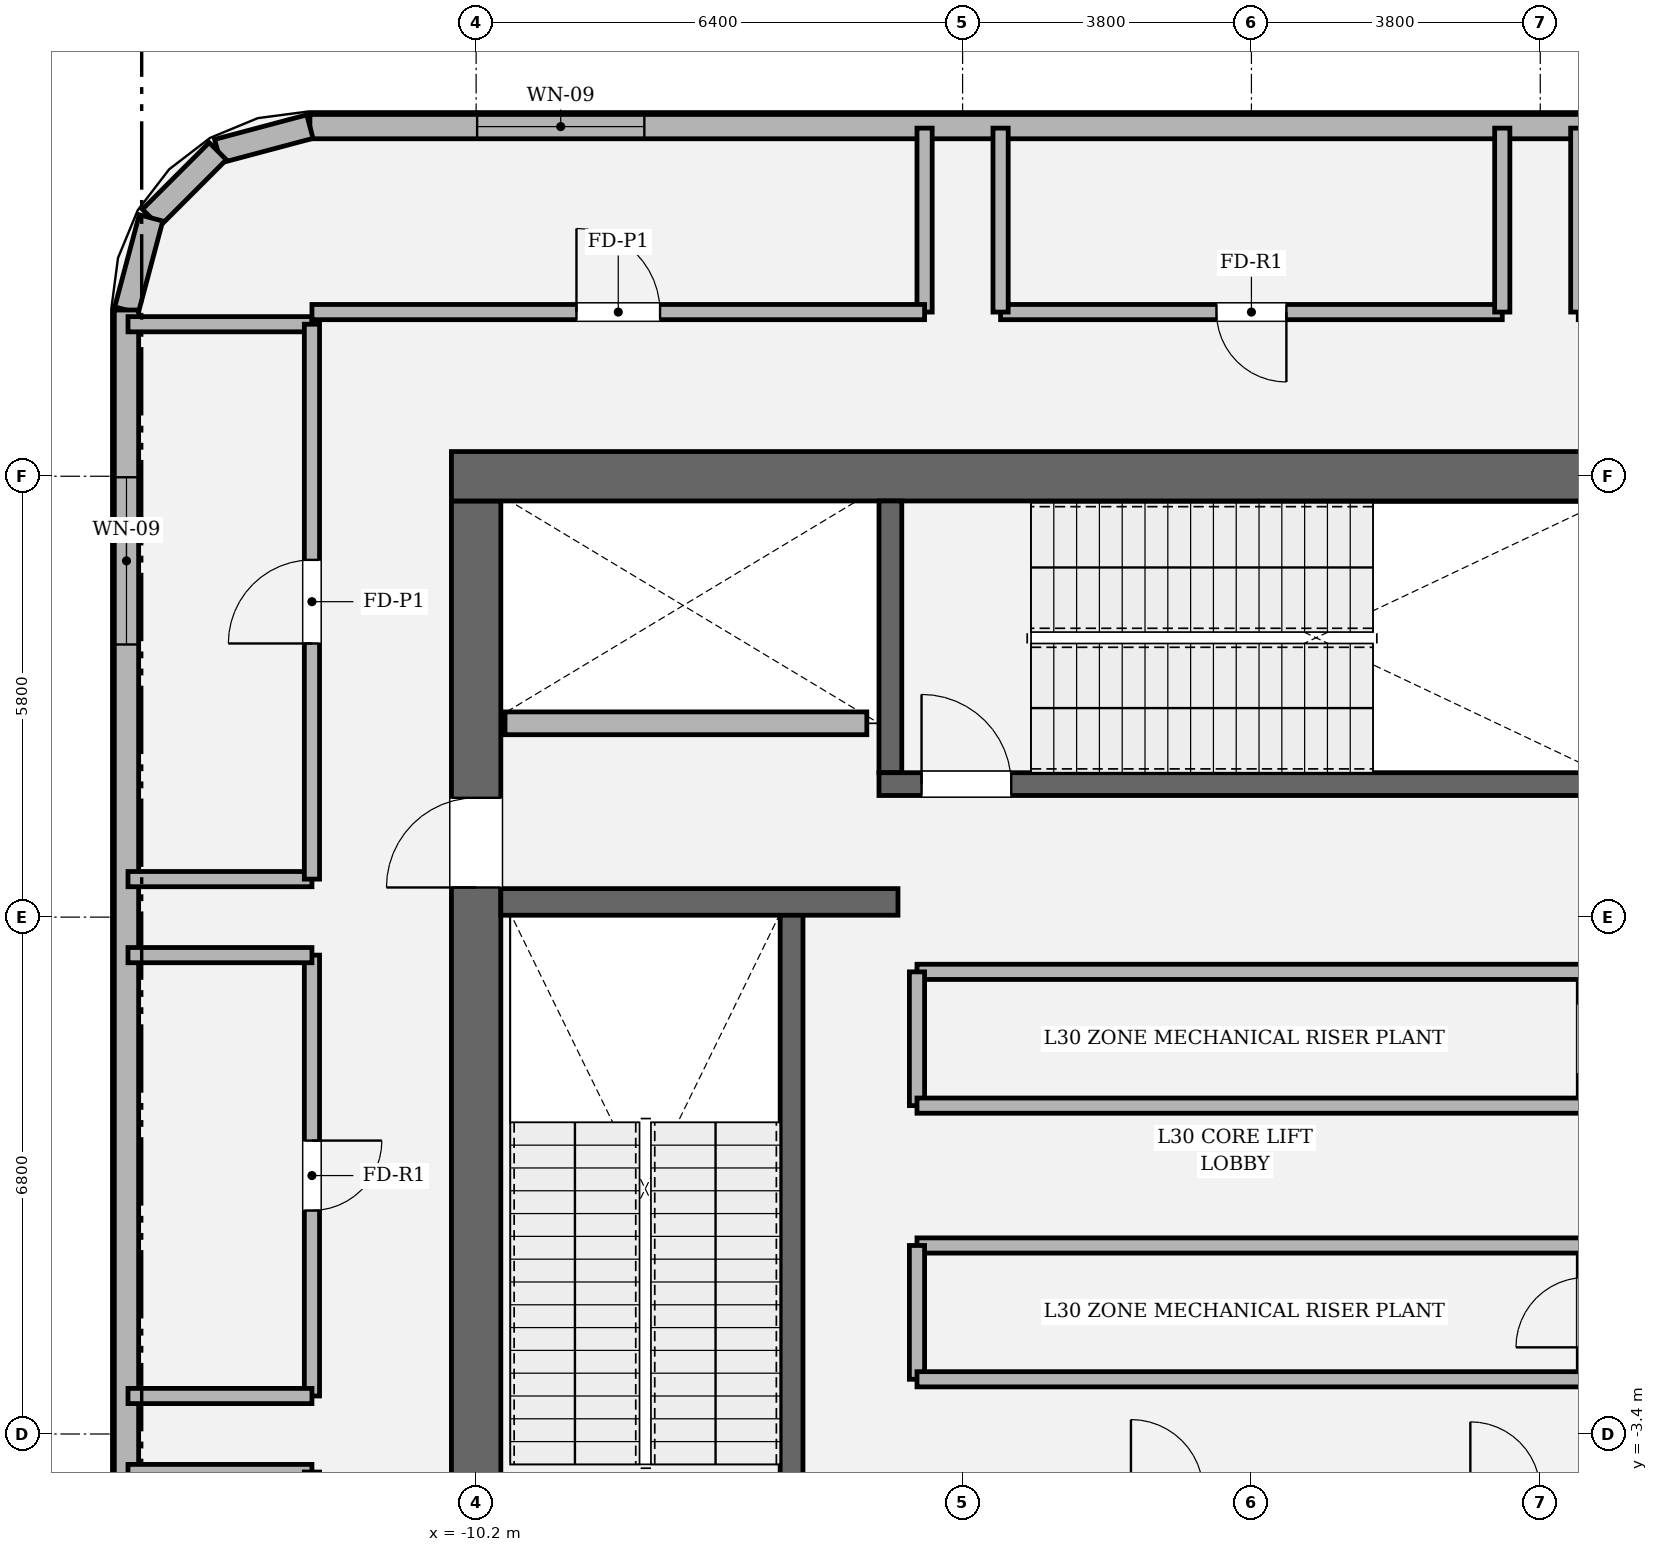
"""IFC4 building model, lengths in metres.
Left out: names, types, materials, properties, quantities, classifications, styles, units other than length and angle.
Written with IfcOpenShell. Run it as: python <this file> out.ifc"""

import sys

from ifc_helpers import new_model, si_unit, direction, frame, frame_2d, origin, place, context, subcontext, project, spatial, rectangle, extrude, element, fill, save


model = new_model("IFC4")
c1 = context("Model", 3, precision=1e-05, world=origin(), true_north=direction((0.0, 1.0)))
c2 = subcontext(c1, "Body", "Model", "MODEL_VIEW")
j1 = project(units=[si_unit("LENGTHUNIT", "METRE"), si_unit("PLANEANGLEUNIT", "RADIAN")], contexts=[c1])
p1 = place(None, origin())
s1 = spatial("IfcSite", under=j1, at=p1, CompositionType="ELEMENT")
p2 = place(p1, origin())
s2 = spatial("IfcBuilding", under=s1, at=p2, CompositionType="ELEMENT")
p3 = place(p2, frame((0.0, 0.0, 130.2)))
s3 = spatial("IfcBuildingStorey", under=s2, at=p3, CompositionType="ELEMENT", Elevation=130.2)
p4 = place(p3, frame((-10.2, -8.875, 0.0), z_axis=(0.0, 0.0, 1.0), x_axis=(0.0, 1.0, 0.0)))
e1 = element("IfcWall", 1, at=p4, inside=s3, PredefinedType="SHEAR", context=c2, shape_type="SweptSolid", body=[
    extrude(rectangle(XDim=17.75, YDim=0.65, at=frame_2d((8.875, 0.0))), origin(), (0.0, 0.0, 1.0), 4.8),
])
p5 = place(p4, frame((12.665, 0.0, 0.0)))
e2 = element("IfcOpeningElement", 2, at=p5, cuts=e1, PredefinedType="OPENING", context=c2, shape_type="SweptSolid", body=[
    extrude(rectangle(XDim=1.18, YDim=2.2, at=frame_2d((0.59, 1.1))), frame((0.0, 0.335, 0.0), z_axis=(0.0, -1.0, 0.0), x_axis=(1.0, 0.0, 0.0)), (0.0, 0.0, 1.0), 0.67),
])
p6 = place(p3, frame((-10.525, 9.2, 0.0), z_axis=(0.0, 0.0, 1.0), x_axis=(1.0, 0.0, 0.0)))
e3 = element("IfcWall", 3, at=p6, inside=s3, PredefinedType="SHEAR", context=c2, shape_type="SweptSolid", body=[
    extrude(rectangle(XDim=21.05, YDim=0.65, at=frame_2d((10.525, 0.0))), origin(), (0.0, 0.0, 1.0), 4.8),
])
p7 = place(p3, frame((-6.05, -5.5, 0.0), z_axis=(0.0, 0.0, 1.0), x_axis=(0.0, 1.0, 0.0)))
e4 = element("IfcWall", 4, at=p7, inside=s3, PredefinedType="SOLIDWALL", context=c2, shape_type="SweptSolid", body=[
    extrude(rectangle(XDim=8.95, YDim=0.3, at=frame_2d((4.475, 0.0))), origin(), (0.0, 0.0, 1.0), 4.8),
])
p8 = place(p3, frame((-4.75, 5.3, 0.0), z_axis=(0.0, 0.0, 1.0), x_axis=(0.0, 1.0, 0.0)))
e5 = element("IfcWall", 5, at=p8, inside=s3, PredefinedType="SOLIDWALL", context=c2, shape_type="SweptSolid", body=[
    extrude(rectangle(XDim=3.575, YDim=0.3, at=frame_2d((1.788, 0.0))), origin(), (0.0, 0.0, 1.0), 4.8),
])
p9 = place(p3, frame((-4.9, 5.15, 0.0), z_axis=(0.0, 0.0, 1.0), x_axis=(1.0, 0.0, 0.0)))
e6 = element("IfcWall", 6, at=p9, inside=s3, PredefinedType="SOLIDWALL", context=c2, shape_type="SweptSolid", body=[
    extrude(rectangle(XDim=9.8, YDim=0.3, at=frame_2d((4.9, 0.0))), origin(), (0.0, 0.0, 1.0), 4.8),
])
p10 = place(p9, frame((0.56, 0.0, 0.0)))
e7 = element("IfcOpeningElement", 7, at=p10, cuts=e6, PredefinedType="OPENING", context=c2, shape_type="SweptSolid", body=[
    extrude(rectangle(XDim=1.18, YDim=2.2, at=frame_2d((0.59, 1.1))), frame((0.0, 0.16, 0.0), z_axis=(0.0, -1.0, 0.0), x_axis=(1.0, 0.0, 0.0)), (0.0, 0.0, 1.0), 0.32),
])
p11 = place(p3, frame((-9.875, 3.6, 0.0), z_axis=(0.0, 0.0, 1.0), x_axis=(1.0, 0.0, 0.0)))
e8 = element("IfcWall", 8, at=p11, inside=s3, PredefinedType="SOLIDWALL", context=c2, shape_type="SweptSolid", body=[
    extrude(rectangle(XDim=5.225, YDim=0.35, at=frame_2d((2.613, 0.0))), origin(), (0.0, 0.0, 1.0), 4.8),
])
p12 = place(p3, frame((12.387, 13.8, 0.0), z_axis=(0.0, 0.0, 1.0), x_axis=(-1.0, 0.0, 0.0)))
e9 = element("IfcWall", 9, at=p12, inside=s3, PredefinedType="SOLIDWALL", context=c2, shape_type="SweptSolid", body=[
    extrude(rectangle(XDim=24.774, YDim=0.32, at=frame_2d((12.387, 0.0))), origin(), (0.0, 0.0, 1.0), 3.834),
])
p13 = place(p12, frame((2.2, 0.0, 0.9)))
e10 = element("IfcOpeningElement", 10, at=p13, cuts=e9, PredefinedType="OPENING", context=c2, shape_type="SweptSolid", body=[
    extrude(rectangle(XDim=2.2, YDim=1.2, at=frame_2d((1.1, 0.6))), frame((0.0, 0.17, 0.0), z_axis=(0.0, -1.0, 0.0), x_axis=(1.0, 0.0, 0.0)), (0.0, 0.0, 1.0), 0.34),
])
p14 = place(p12, frame((20.374, 0.0, 0.9)))
e11 = element("IfcOpeningElement", 11, at=p14, cuts=e9, PredefinedType="OPENING", context=c2, shape_type="SweptSolid", body=[
    extrude(rectangle(XDim=2.2, YDim=1.2, at=frame_2d((1.1, 0.6))), frame((0.0, 0.17, 0.0), z_axis=(0.0, -1.0, 0.0), x_axis=(1.0, 0.0, 0.0)), (0.0, 0.0, 1.0), 0.34),
])
p15 = place(p3, frame((-12.387, 13.8, 0.0), z_axis=(0.0, 0.0, 1.0), x_axis=(-0.966283375382, -0.25748094776, 0.0)))
e12 = element("IfcWall", 12, at=p15, inside=s3, PredefinedType="SOLIDWALL", context=c2, shape_type="SweptSolid", body=[
    extrude(rectangle(XDim=1.254, YDim=0.32, at=frame_2d((0.627, 0.0))), origin(), (0.0, 0.0, 1.0), 3.984),
])
p16 = place(p3, frame((-13.599, 13.477, 0.0), z_axis=(0.0, 0.0, 1.0), x_axis=(-0.707106781187, -0.707106781187, 0.0)))
e13 = element("IfcWall", 13, at=p16, inside=s3, PredefinedType="SOLIDWALL", context=c2, shape_type="SweptSolid", body=[
    extrude(rectangle(XDim=1.242, YDim=0.32, at=frame_2d((0.621, 0.0))), origin(), (0.0, 0.0, 1.0), 3.984),
])
p17 = place(p3, frame((-14.477, 12.599, 0.0), z_axis=(0.0, 0.0, 1.0), x_axis=(-0.25748094776, -0.966283375382, 0.0)))
e14 = element("IfcWall", 14, at=p17, inside=s3, PredefinedType="SOLIDWALL", context=c2, shape_type="SweptSolid", body=[
    extrude(rectangle(XDim=1.254, YDim=0.32, at=frame_2d((0.627, 0.0))), origin(), (0.0, 0.0, 1.0), 3.984),
])
p18 = place(p3, frame((-14.8, 11.387, 0.0), z_axis=(0.0, 0.0, 1.0), x_axis=(0.0, -1.0, 0.0)))
e15 = element("IfcWall", 15, at=p18, inside=s3, PredefinedType="SOLIDWALL", context=c2, shape_type="SweptSolid", body=[
    extrude(rectangle(XDim=22.774, YDim=0.32, at=frame_2d((11.387, 0.0))), origin(), (0.0, 0.0, 1.0), 3.834),
])
p19 = place(p18, frame((2.2, 0.0, 0.9)))
e16 = element("IfcOpeningElement", 16, at=p19, cuts=e15, PredefinedType="OPENING", context=c2, shape_type="SweptSolid", body=[
    extrude(rectangle(XDim=2.2, YDim=1.2, at=frame_2d((1.1, 0.6))), frame((0.0, 0.17, 0.0), z_axis=(0.0, -1.0, 0.0), x_axis=(1.0, 0.0, 0.0)), (0.0, 0.0, 1.0), 0.34),
])
p20 = place(p18, frame((18.374, 0.0, 0.9)))
e17 = element("IfcOpeningElement", 17, at=p20, cuts=e15, PredefinedType="OPENING", context=c2, shape_type="SweptSolid", body=[
    extrude(rectangle(XDim=2.2, YDim=1.2, at=frame_2d((1.1, 0.6))), frame((0.0, 0.17, 0.0), z_axis=(0.0, -1.0, 0.0), x_axis=(1.0, 0.0, 0.0)), (0.0, 0.0, 1.0), 0.34),
])
p21 = place(p3, frame((-9.82, 5.95, 0.0), z_axis=(0.0, 0.0, 1.0), x_axis=(1.0, 0.0, 0.0)))
e18 = element("IfcWall", 18, at=p21, inside=s3, PredefinedType="SOLIDWALL", context=c2, shape_type="SweptSolid", body=[
    extrude(rectangle(XDim=4.76, YDim=0.3, at=frame_2d((2.38, 0.0))), origin(), (0.0, 0.0, 1.0), 4.54),
])
p22 = place(p3, frame((4.4, -2.68, 0.0), z_axis=(0.0, 0.0, 1.0), x_axis=(0.0, 1.0, 0.0)))
e19 = element("IfcWall", 19, at=p22, inside=s3, PredefinedType="SOLIDWALL", context=c2, shape_type="SweptSolid", body=[
    extrude(rectangle(XDim=1.76, YDim=0.2, at=frame_2d((0.88, 0.0))), origin(), (0.0, 0.0, 1.0), 4.54),
])
p23 = place(p22, frame((0.42, 0.0, 0.0)))
e20 = element("IfcOpeningElement", 20, at=p23, cuts=e19, PredefinedType="OPENING", context=c2, shape_type="SweptSolid", body=[
    extrude(rectangle(XDim=0.92, YDim=2.1, at=frame_2d((0.46, 1.05))), frame((0.0, 0.11, 0.0), z_axis=(0.0, -1.0, 0.0), x_axis=(1.0, 0.0, 0.0)), (0.0, 0.0, 1.0), 0.22),
])
p24 = place(p3, frame((4.4, -0.92, 0.0), z_axis=(0.0, 0.0, 1.0), x_axis=(-1.0, 0.0, 0.0)))
e21 = element("IfcWall", 21, at=p24, inside=s3, PredefinedType="SOLIDWALL", context=c2, shape_type="SweptSolid", body=[
    extrude(rectangle(XDim=8.8, YDim=0.2, at=frame_2d((4.4, 0.0))), origin(), (0.0, 0.0, 1.0), 4.54),
])
p25 = place(p3, frame((-4.4, -0.92, 0.0), z_axis=(0.0, 0.0, 1.0), x_axis=(0.0, -1.0, 0.0)))
e22 = element("IfcWall", 22, at=p25, inside=s3, PredefinedType="SOLIDWALL", context=c2, shape_type="SweptSolid", body=[
    extrude(rectangle(XDim=1.76, YDim=0.2, at=frame_2d((0.88, 0.0))), origin(), (0.0, 0.0, 1.0), 4.54),
])
p26 = place(p3, frame((-4.4, -2.68, 0.0), z_axis=(0.0, 0.0, 1.0), x_axis=(1.0, 0.0, 0.0)))
e23 = element("IfcWall", 23, at=p26, inside=s3, PredefinedType="SOLIDWALL", context=c2, shape_type="SweptSolid", body=[
    extrude(rectangle(XDim=8.8, YDim=0.2, at=frame_2d((4.4, 0.0))), origin(), (0.0, 0.0, 1.0), 4.54),
])
p27 = place(p3, frame((4.4, 0.92, 0.0), z_axis=(0.0, 0.0, 1.0), x_axis=(0.0, 1.0, 0.0)))
e24 = element("IfcWall", 24, at=p27, inside=s3, PredefinedType="SOLIDWALL", context=c2, shape_type="SweptSolid", body=[
    extrude(rectangle(XDim=1.76, YDim=0.2, at=frame_2d((0.88, 0.0))), origin(), (0.0, 0.0, 1.0), 4.54),
])
p28 = place(p27, frame((0.42, 0.0, 0.0)))
e25 = element("IfcOpeningElement", 25, at=p28, cuts=e24, PredefinedType="OPENING", context=c2, shape_type="SweptSolid", body=[
    extrude(rectangle(XDim=0.92, YDim=2.1, at=frame_2d((0.46, 1.05))), frame((0.0, 0.11, 0.0), z_axis=(0.0, -1.0, 0.0), x_axis=(1.0, 0.0, 0.0)), (0.0, 0.0, 1.0), 0.22),
])
p29 = place(p3, frame((4.4, 2.68, 0.0), z_axis=(0.0, 0.0, 1.0), x_axis=(-1.0, 0.0, 0.0)))
e26 = element("IfcWall", 26, at=p29, inside=s3, PredefinedType="SOLIDWALL", context=c2, shape_type="SweptSolid", body=[
    extrude(rectangle(XDim=8.8, YDim=0.2, at=frame_2d((4.4, 0.0))), origin(), (0.0, 0.0, 1.0), 4.54),
])
p30 = place(p3, frame((-4.4, 2.68, 0.0), z_axis=(0.0, 0.0, 1.0), x_axis=(0.0, -1.0, 0.0)))
e27 = element("IfcWall", 27, at=p30, inside=s3, PredefinedType="SOLIDWALL", context=c2, shape_type="SweptSolid", body=[
    extrude(rectangle(XDim=1.76, YDim=0.2, at=frame_2d((0.88, 0.0))), origin(), (0.0, 0.0, 1.0), 4.54),
])
p31 = place(p3, frame((-4.4, 0.92, 0.0), z_axis=(0.0, 0.0, 1.0), x_axis=(1.0, 0.0, 0.0)))
e28 = element("IfcWall", 28, at=p31, inside=s3, PredefinedType="SOLIDWALL", context=c2, shape_type="SweptSolid", body=[
    extrude(rectangle(XDim=8.8, YDim=0.2, at=frame_2d((4.4, 0.0))), origin(), (0.0, 0.0, 1.0), 4.54),
])
p32 = place(p3, frame((-14.78, -3.9, 0.0), z_axis=(0.0, 0.0, 1.0), x_axis=(1.0, 0.0, 0.0)))
e29 = element("IfcWall", 29, at=p32, inside=s3, PredefinedType="SOLIDWALL", context=c2, shape_type="SweptSolid", body=[
    extrude(rectangle(XDim=2.42, YDim=0.2, at=frame_2d((1.21, 0.0))), origin(), (0.0, 0.0, 1.0), 3.984),
])
p33 = place(p3, frame((-12.36, -3.9, 0.0), z_axis=(0.0, 0.0, 1.0), x_axis=(0.0, -1.0, 0.0)))
e30 = element("IfcWall", 30, at=p33, inside=s3, PredefinedType="SOLIDWALL", context=c2, shape_type="SweptSolid", body=[
    extrude(rectangle(XDim=7.3, YDim=0.2, at=frame_2d((3.65, 0.0))), origin(), (0.0, 0.0, 1.0), 4.54),
])
p34 = place(p33, frame((3.1, 0.0, 0.0)))
e31 = element("IfcOpeningElement", 31, at=p34, cuts=e30, PredefinedType="OPENING", context=c2, shape_type="SweptSolid", body=[
    extrude(rectangle(XDim=1.1, YDim=2.2, at=frame_2d((0.55, 1.1))), frame((0.0, 0.11, 0.0), z_axis=(0.0, -1.0, 0.0), x_axis=(1.0, 0.0, 0.0)), (0.0, 0.0, 1.0), 0.22),
])
p35 = place(p3, frame((-12.36, 2.9, 0.0), z_axis=(0.0, 0.0, 1.0), x_axis=(0.0, -1.0, 0.0)))
e32 = element("IfcWall", 32, at=p35, inside=s3, PredefinedType="SOLIDWALL", context=c2, shape_type="SweptSolid", body=[
    extrude(rectangle(XDim=5.8, YDim=0.2, at=frame_2d((2.9, 0.0))), origin(), (0.0, 0.0, 1.0), 4.54),
])
p36 = place(p35, frame((2.44, 0.0, 0.0)))
e33 = element("IfcOpeningElement", 33, at=p36, cuts=e32, PredefinedType="OPENING", context=c2, shape_type="SweptSolid", body=[
    extrude(rectangle(XDim=0.92, YDim=2.1, at=frame_2d((0.46, 1.05))), frame((0.0, 0.11, 0.0), z_axis=(0.0, -1.0, 0.0), x_axis=(1.0, 0.0, 0.0)), (0.0, 0.0, 1.0), 0.22),
])
for number, where, z_axis, x_axis in (
    (34, (-12.36, -2.9, 0.0), (0.0, 0.0, 1.0), (-1.0, 0.0, 0.0)),
    (35, (-14.78, 2.9, 0.0), (0.0, 0.0, 1.0), (1.0, 0.0, 0.0)),
    (36, (-12.36, 3.9, 0.0), (0.0, 0.0, 1.0), (-1.0, 0.0, 0.0)),
    (37, (-14.78, 11.2, 0.0), (0.0, 0.0, 1.0), (1.0, 0.0, 0.0)),
):
    element("IfcWall", number, at=place(p3, frame(where, z_axis=z_axis, x_axis=x_axis)), inside=s3, PredefinedType="SOLIDWALL", context=c2, shape_type="SweptSolid", body=[
        extrude(rectangle(XDim=2.42, YDim=0.2, at=frame_2d((1.21, 0.0))), origin(), (0.0, 0.0, 1.0), 3.984),
    ])
p37 = place(p3, frame((-12.36, 11.2, 0.0), z_axis=(0.0, 0.0, 1.0), x_axis=(0.0, -1.0, 0.0)))
e38 = element("IfcWall", 38, at=p37, inside=s3, PredefinedType="SOLIDWALL", context=c2, shape_type="SweptSolid", body=[
    extrude(rectangle(XDim=7.3, YDim=0.2, at=frame_2d((3.65, 0.0))), origin(), (0.0, 0.0, 1.0), 4.54),
])
p38 = place(p37, frame((3.1, 0.0, 0.0)))
e39 = element("IfcOpeningElement", 39, at=p38, cuts=e38, PredefinedType="OPENING", context=c2, shape_type="SweptSolid", body=[
    extrude(rectangle(XDim=1.1, YDim=2.2, at=frame_2d((0.55, 1.1))), frame((0.0, 0.11, 0.0), z_axis=(0.0, -1.0, 0.0), x_axis=(1.0, 0.0, 0.0)), (0.0, 0.0, 1.0), 0.22),
])
p39 = place(p3, frame((-4.3, 13.78, 0.0), z_axis=(0.0, 0.0, 1.0), x_axis=(0.0, -1.0, 0.0)))
e40 = element("IfcWall", 40, at=p39, inside=s3, PredefinedType="SOLIDWALL", context=c2, shape_type="SweptSolid", body=[
    extrude(rectangle(XDim=2.42, YDim=0.2, at=frame_2d((1.21, 0.0))), origin(), (0.0, 0.0, 1.0), 3.984),
])
p40 = place(p3, frame((-4.3, 11.36, 0.0), z_axis=(0.0, 0.0, 1.0), x_axis=(-1.0, 0.0, 0.0)))
e41 = element("IfcWall", 41, at=p40, inside=s3, PredefinedType="SOLIDWALL", context=c2, shape_type="SweptSolid", body=[
    extrude(rectangle(XDim=8.06, YDim=0.2, at=frame_2d((4.03, 0.0))), origin(), (0.0, 0.0, 1.0), 4.54),
])
p41 = place(p40, frame((3.48, 0.0, 0.0)))
e42 = element("IfcOpeningElement", 42, at=p41, cuts=e41, PredefinedType="OPENING", context=c2, shape_type="SweptSolid", body=[
    extrude(rectangle(XDim=1.1, YDim=2.2, at=frame_2d((0.55, 1.1))), frame((0.0, 0.11, 0.0), z_axis=(0.0, -1.0, 0.0), x_axis=(1.0, 0.0, 0.0)), (0.0, 0.0, 1.0), 0.22),
])
p42 = place(p3, frame((3.3, 11.36, 0.0), z_axis=(0.0, 0.0, 1.0), x_axis=(-1.0, 0.0, 0.0)))
e43 = element("IfcWall", 43, at=p42, inside=s3, PredefinedType="SOLIDWALL", context=c2, shape_type="SweptSolid", body=[
    extrude(rectangle(XDim=6.6, YDim=0.2, at=frame_2d((3.3, 0.0))), origin(), (0.0, 0.0, 1.0), 4.54),
])
p43 = place(p42, frame((2.84, 0.0, 0.0)))
e44 = element("IfcOpeningElement", 44, at=p43, cuts=e43, PredefinedType="OPENING", context=c2, shape_type="SweptSolid", body=[
    extrude(rectangle(XDim=0.92, YDim=2.1, at=frame_2d((0.46, 1.05))), frame((0.0, 0.11, 0.0), z_axis=(0.0, -1.0, 0.0), x_axis=(1.0, 0.0, 0.0)), (0.0, 0.0, 1.0), 0.22),
])
for number, where, z_axis, x_axis in (
    (45, (-3.3, 11.36, 0.0), (0.0, 0.0, 1.0), (0.0, 1.0, 0.0)),
    (46, (3.3, 13.78, 0.0), (0.0, 0.0, 1.0), (0.0, -1.0, 0.0)),
    (47, (4.3, 11.36, 0.0), (0.0, 0.0, 1.0), (0.0, 1.0, 0.0)),
):
    element("IfcWall", number, at=place(p3, frame(where, z_axis=z_axis, x_axis=x_axis)), inside=s3, PredefinedType="SOLIDWALL", context=c2, shape_type="SweptSolid", body=[
        extrude(rectangle(XDim=2.42, YDim=0.2, at=frame_2d((1.21, 0.0))), origin(), (0.0, 0.0, 1.0), 3.984),
    ])
p44 = place(p14, origin())
e48 = element("IfcWindow", 48, at=p44, inside=s3, PartitioningType="SINGLE_PANEL", PredefinedType="WINDOW", context=c2, shape_type="SweptSolid", body=[
    extrude(rectangle(XDim=2.2, YDim=1.2, at=frame_2d((1.1, 0.6))), frame((0.0, 0.03, 0.0), z_axis=(0.0, -1.0, 0.0), x_axis=(1.0, 0.0, 0.0)), (0.0, 0.0, 1.0), 0.06),
])
fill(e11, e48)
p45 = place(p19, origin())
e49 = element("IfcWindow", 49, at=p45, inside=s3, PartitioningType="SINGLE_PANEL", PredefinedType="WINDOW", context=c2, shape_type="SweptSolid", body=[
    extrude(rectangle(XDim=2.2, YDim=1.2, at=frame_2d((1.1, 0.6))), frame((0.0, 0.03, 0.0), z_axis=(0.0, -1.0, 0.0), x_axis=(1.0, 0.0, 0.0)), (0.0, 0.0, 1.0), 0.06),
])
fill(e16, e49)
p46 = place(p10, origin())
e50 = element("IfcDoor", 50, at=p46, inside=s3, OperationType="SINGLE_SWING_LEFT", PredefinedType="DOOR", context=c2, shape_type="SweptSolid", body=[
    extrude(rectangle(XDim=1.18, YDim=2.2, at=frame_2d((0.59, 1.1))), frame((0.0, 0.025, 0.0), z_axis=(0.0, -1.0, 0.0), x_axis=(1.0, 0.0, 0.0)), (0.0, 0.0, 1.0), 0.05),
])
fill(e7, e50)
p47 = place(p5, origin())
e51 = element("IfcDoor", 51, at=p47, inside=s3, OperationType="SINGLE_SWING_LEFT", PredefinedType="DOOR", context=c2, shape_type="SweptSolid", body=[
    extrude(rectangle(XDim=1.18, YDim=2.2, at=frame_2d((0.59, 1.1))), frame((0.0, 0.025, 0.0), z_axis=(0.0, -1.0, 0.0), x_axis=(1.0, 0.0, 0.0)), (0.0, 0.0, 1.0), 0.05),
])
fill(e2, e51)
p48 = place(p36, origin())
e52 = element("IfcDoor", 52, at=p48, inside=s3, OperationType="SINGLE_SWING_LEFT", PredefinedType="DOOR", context=c2, shape_type="SweptSolid", body=[
    extrude(rectangle(XDim=0.92, YDim=2.1, at=frame_2d((0.46, 1.05))), frame((0.0, 0.025, 0.0), z_axis=(0.0, -1.0, 0.0), x_axis=(1.0, 0.0, 0.0)), (0.0, 0.0, 1.0), 0.05),
])
fill(e33, e52)
p49 = place(p38, origin())
e53 = element("IfcDoor", 53, at=p49, inside=s3, OperationType="SINGLE_SWING_RIGHT", PredefinedType="DOOR", context=c2, shape_type="SweptSolid", body=[
    extrude(rectangle(XDim=1.1, YDim=2.2, at=frame_2d((0.55, 1.1))), frame((0.0, 0.025, 0.0), z_axis=(0.0, -1.0, 0.0), x_axis=(1.0, 0.0, 0.0)), (0.0, 0.0, 1.0), 0.05),
])
fill(e39, e53)
p50 = place(p41, origin())
e54 = element("IfcDoor", 54, at=p50, inside=s3, OperationType="SINGLE_SWING_RIGHT", PredefinedType="DOOR", context=c2, shape_type="SweptSolid", body=[
    extrude(rectangle(XDim=1.1, YDim=2.2, at=frame_2d((0.55, 1.1))), frame((0.0, 0.025, 0.0), z_axis=(0.0, -1.0, 0.0), x_axis=(1.0, 0.0, 0.0)), (0.0, 0.0, 1.0), 0.05),
])
fill(e42, e54)
p51 = place(p43, origin())
e55 = element("IfcDoor", 55, at=p51, inside=s3, OperationType="SINGLE_SWING_LEFT", PredefinedType="DOOR", context=c2, shape_type="SweptSolid", body=[
    extrude(rectangle(XDim=0.92, YDim=2.1, at=frame_2d((0.46, 1.05))), frame((0.0, 0.025, 0.0), z_axis=(0.0, -1.0, 0.0), x_axis=(1.0, 0.0, 0.0)), (0.0, 0.0, 1.0), 0.05),
])
fill(e44, e55)
save(model, sys.argv[1])
